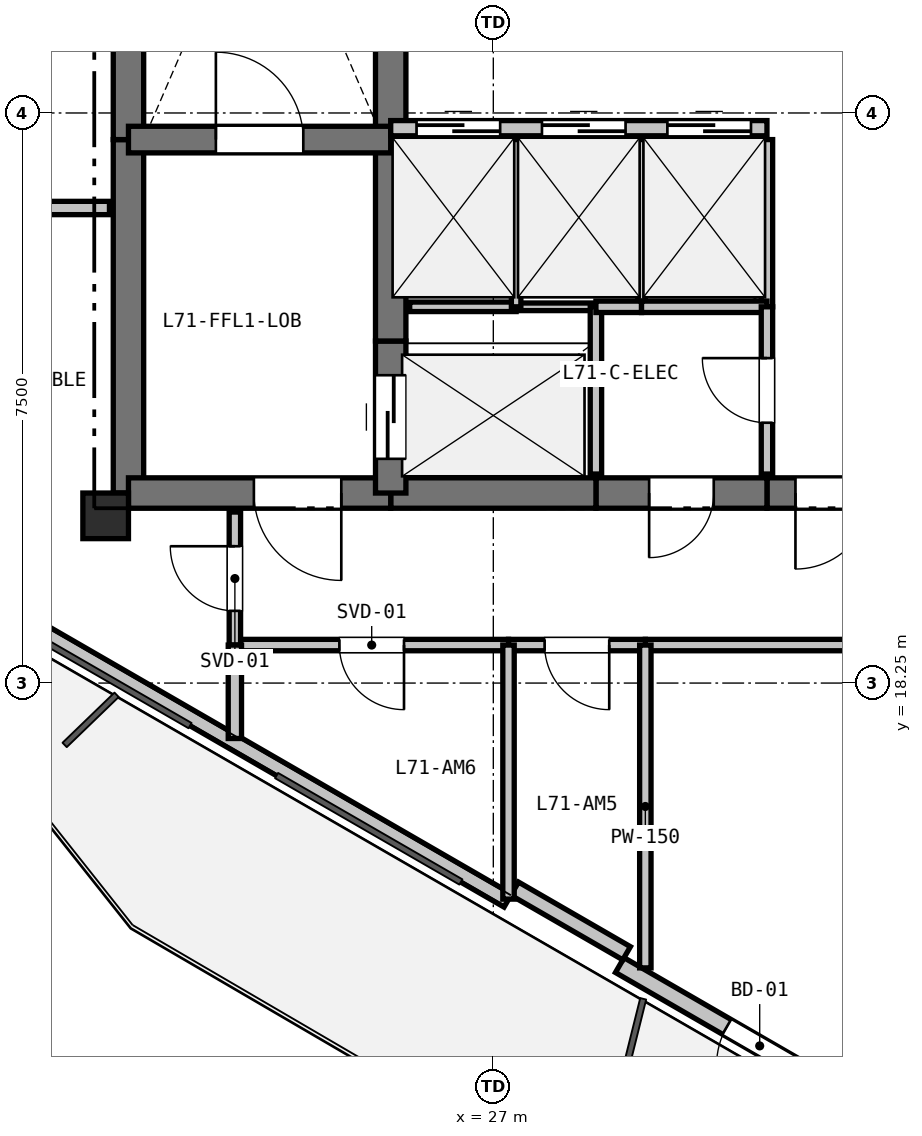
"""IFC4 building model, lengths in metres.
Left out: names, types, materials, properties, quantities, classifications, styles, units other than length and angle.
Written with IfcOpenShell. Run it as: python <this file> out.ifc"""

import sys

from ifc_helpers import new_model, si_unit, direction, frame, frame_2d, origin, origin_2d, place, context, subcontext, project, spatial, rectangle, extrude, element, fill, save


model = new_model("IFC4")
c1 = context("Model", 3, precision=1e-05, world=origin(), true_north=direction((0.0, 1.0)))
c2 = subcontext(c1, "Body", "Model", "MODEL_VIEW")
j1 = project(units=[si_unit("LENGTHUNIT", "METRE"), si_unit("PLANEANGLEUNIT", "RADIAN")], contexts=[c1])
p1 = place(None, origin())
s1 = spatial("IfcSite", under=j1, at=p1, CompositionType="ELEMENT")
p2 = place(p1, origin())
s2 = spatial("IfcBuilding", under=s1, at=p2, CompositionType="ELEMENT")
p3 = place(p2, frame((0.0, 0.0, 254.1)))
s3 = spatial("IfcBuildingStorey", under=s2, at=p3, CompositionType="ELEMENT", Elevation=254.1)
p4 = place(p3, frame((21.9, 20.45, 0.0), z_axis=(0.0, 0.0, 1.0), x_axis=(1.0, 0.0, 0.0)))
e1 = element("IfcColumn", 1, at=p4, inside=s3, PredefinedType="COLUMN", context=c2, shape_type="SweptSolid", body=[
    extrude(rectangle(XDim=0.6, YDim=0.6, at=origin_2d()), origin(), (0.0, 0.0, 1.0), 4.5),
])
p5 = place(p3, frame((36.395, 10.076, 0.0), z_axis=(0.0, 0.0, 1.0), x_axis=(-0.866026655105, 0.499997832642, 0.0)))
e2 = element("IfcWall", 2, at=p5, inside=s3, PredefinedType="SOLIDWALL", context=c2, shape_type="SweptSolid", body=[
    extrude(rectangle(XDim=8.928, YDim=0.225, at=frame_2d((4.464, 0.0))), origin(), (0.0, 0.0, 1.0), 3.8),
])
p6 = place(p5, frame((6.302, 0.0, 0.0)))
e3 = element("IfcOpeningElement", 3, at=p6, cuts=e2, PredefinedType="OPENING", context=c2, shape_type="SweptSolid", body=[
    extrude(rectangle(XDim=1.0, YDim=2.1, at=frame_2d((0.5, 1.05))), frame((0.0, 0.123, 0.0), z_axis=(0.0, -1.0, 0.0), x_axis=(1.0, 0.0, 0.0)), (0.0, 0.0, 1.0), 0.245),
])
p7 = place(p3, frame((27.191, 15.389, 0.0), z_axis=(0.0, 0.0, 1.0), x_axis=(-0.866019557082, 0.500010126649, 0.0)))
e4 = element("IfcWall", 4, at=p7, inside=s3, PredefinedType="PARAPET", context=c2, shape_type="SweptSolid", body=[
    extrude(rectangle(XDim=8.228, YDim=0.2, at=frame_2d((4.114, 0.0))), origin(), (0.0, 0.0, 1.0), 0.2),
])
p8 = place(p3, frame((28.754, 14.695, 0.0), z_axis=(0.0, 0.0, 1.0), x_axis=(-0.866025371046, 0.500000056704, 0.0)))
e5 = element("IfcWall", 5, at=p8, inside=s3, PredefinedType="PARAPET", context=c2, shape_type="SweptSolid", body=[
    extrude(rectangle(XDim=1.7, YDim=0.2, at=frame_2d((0.85, 0.0))), origin(), (0.0, 0.0, 1.0), 3.8),
])
p9 = place(p3, frame((22.2, 20.75, 0.0), z_axis=(0.0, 0.0, 1.0), x_axis=(0.0, 1.0, 0.0)))
e6 = element("IfcWall", 6, at=p9, inside=s3, PredefinedType="SHEAR", context=c2, shape_type="SweptSolid", body=[
    extrude(rectangle(XDim=4.65, YDim=0.4, at=frame_2d((2.325, 0.0))), origin(), (0.0, 0.0, 1.0), 4.18),
])
p10 = place(p3, frame((22.2, 25.4, 0.0), z_axis=(0.0, 0.0, 1.0), x_axis=(0.0, 1.0, 0.0)))
e7 = element("IfcWall", 7, at=p10, inside=s3, PredefinedType="SHEAR", context=c2, shape_type="SweptSolid", body=[
    extrude(rectangle(XDim=7.35, YDim=0.4, at=frame_2d((3.675, 0.0))), origin(), (0.0, 0.0, 1.0), 4.18),
])
p11 = place(p3, frame((32.35, 20.75, 0.0), z_axis=(0.0, 0.0, 1.0), x_axis=(-1.0, 0.0, 0.0)))
e8 = element("IfcWall", 8, at=p11, inside=s3, PredefinedType="SHEAR", context=c2, shape_type="SweptSolid", body=[
    extrude(rectangle(XDim=1.75, YDim=0.4, at=frame_2d((0.875, 0.0))), origin(), (0.0, 0.0, 1.0), 4.18),
])
p12 = place(p11, frame((0.375, 0.0, 0.0)))
e9 = element("IfcOpeningElement", 9, at=p12, cuts=e8, PredefinedType="OPENING", context=c2, shape_type="SweptSolid", body=[
    extrude(rectangle(XDim=1.0, YDim=2.15, at=frame_2d((0.5, 1.075))), frame((0.0, 0.21, 0.0), z_axis=(0.0, -1.0, 0.0), x_axis=(1.0, 0.0, 0.0)), (0.0, 0.0, 1.0), 0.42),
])
p13 = place(p3, frame((30.6, 20.75, 0.0), z_axis=(0.0, 0.0, 1.0), x_axis=(-1.0, 0.0, 0.0)))
e10 = element("IfcWall", 10, at=p13, inside=s3, PredefinedType="SHEAR", context=c2, shape_type="SweptSolid", body=[
    extrude(rectangle(XDim=2.25, YDim=0.4, at=frame_2d((1.125, 0.0))), origin(), (0.0, 0.0, 1.0), 4.18),
])
p14 = place(p13, frame((0.7, 0.0, 0.0)))
e11 = element("IfcOpeningElement", 11, at=p14, cuts=e10, PredefinedType="OPENING", context=c2, shape_type="SweptSolid", body=[
    extrude(rectangle(XDim=0.85, YDim=2.1, at=frame_2d((0.425, 1.05))), frame((0.0, 0.21, 0.0), z_axis=(0.0, -1.0, 0.0), x_axis=(1.0, 0.0, 0.0)), (0.0, 0.0, 1.0), 0.42),
])
p15 = place(p3, frame((28.35, 20.75, 0.0), z_axis=(0.0, 0.0, 1.0), x_axis=(-1.0, 0.0, 0.0)))
e12 = element("IfcWall", 12, at=p15, inside=s3, PredefinedType="SHEAR", context=c2, shape_type="SweptSolid", body=[
    extrude(rectangle(XDim=2.7, YDim=0.4, at=frame_2d((1.35, 0.0))), origin(), (0.0, 0.0, 1.0), 4.18),
])
p16 = place(p3, frame((25.65, 20.75, 0.0), z_axis=(0.0, 0.0, 1.0), x_axis=(-1.0, 0.0, 0.0)))
e13 = element("IfcWall", 13, at=p16, inside=s3, PredefinedType="SHEAR", context=c2, shape_type="SweptSolid", body=[
    extrude(rectangle(XDim=3.45, YDim=0.4, at=frame_2d((1.725, 0.0))), origin(), (0.0, 0.0, 1.0), 4.18),
])
p17 = place(p16, frame((0.65, 0.0, 0.0)))
e14 = element("IfcOpeningElement", 14, at=p17, cuts=e13, PredefinedType="OPENING", context=c2, shape_type="SweptSolid", body=[
    extrude(rectangle(XDim=1.15, YDim=2.15, at=frame_2d((0.575, 1.075))), frame((0.0, 0.21, 0.0), z_axis=(0.0, -1.0, 0.0), x_axis=(1.0, 0.0, 0.0)), (0.0, 0.0, 1.0), 0.42),
])
p18 = place(p3, frame((25.65, 20.75, 0.0), z_axis=(0.0, 0.0, 1.0), x_axis=(0.0, 1.0, 0.0)))
e15 = element("IfcWall", 15, at=p18, inside=s3, PredefinedType="SHEAR", context=c2, shape_type="SweptSolid", body=[
    extrude(rectangle(XDim=2.0, YDim=0.4, at=frame_2d((1.0, 0.0))), origin(), (0.0, 0.0, 1.0), 4.18),
])
p19 = place(p18, frame((0.45, 0.0, 0.0)))
e16 = element("IfcOpeningElement", 16, at=p19, cuts=e15, PredefinedType="OPENING", context=c2, shape_type="SweptSolid", body=[
    extrude(rectangle(XDim=1.1, YDim=2.15, at=frame_2d((0.55, 1.075))), frame((0.0, 0.21, 0.0), z_axis=(0.0, -1.0, 0.0), x_axis=(1.0, 0.0, 0.0)), (0.0, 0.0, 1.0), 0.42),
])
p20 = place(p3, frame((25.65, 22.75, 0.0), z_axis=(0.0, 0.0, 1.0), x_axis=(0.0, 1.0, 0.0)))
e17 = element("IfcWall", 17, at=p20, inside=s3, PredefinedType="SHEAR", context=c2, shape_type="SweptSolid", body=[
    extrude(rectangle(XDim=2.8, YDim=0.4, at=frame_2d((1.4, 0.0))), origin(), (0.0, 0.0, 1.0), 4.18),
])
p21 = place(p3, frame((25.65, 25.55, 0.0), z_axis=(0.0, 0.0, 1.0), x_axis=(0.0, 1.0, 0.0)))
e18 = element("IfcWall", 18, at=p21, inside=s3, PredefinedType="SHEAR", context=c2, shape_type="SweptSolid", body=[
    extrude(rectangle(XDim=2.4, YDim=0.4, at=frame_2d((1.2, 0.0))), origin(), (0.0, 0.0, 1.0), 4.18),
])
p22 = place(p3, frame((22.2, 25.4, 0.0), z_axis=(0.0, 0.0, 1.0), x_axis=(1.0, 0.0, 0.0)))
e19 = element("IfcWall", 19, at=p22, inside=s3, PredefinedType="SHEAR", context=c2, shape_type="SweptSolid", body=[
    extrude(rectangle(XDim=3.45, YDim=0.35, at=frame_2d((1.725, 0.0))), origin(), (0.0, 0.0, 1.0), 4.18),
])
p23 = place(p22, frame((1.15, 0.0, 0.0)))
e20 = element("IfcOpeningElement", 20, at=p23, cuts=e19, PredefinedType="OPENING", context=c2, shape_type="SweptSolid", body=[
    extrude(rectangle(XDim=1.15, YDim=2.15, at=frame_2d((0.575, 1.075))), frame((0.0, 0.185, 0.0), z_axis=(0.0, -1.0, 0.0), x_axis=(1.0, 0.0, 0.0)), (0.0, 0.0, 1.0), 0.37),
])
p24 = place(p3, frame((25.65, 25.55, 0.0), z_axis=(0.0, 0.0, 1.0), x_axis=(1.0, 0.0, 0.0)))
e21 = element("IfcWall", 21, at=p24, inside=s3, PredefinedType="PARTITIONING", context=c2, shape_type="SweptSolid", body=[
    extrude(rectangle(XDim=4.95, YDim=0.2, at=frame_2d((2.475, 0.0))), origin(), (0.0, 0.0, 1.0), 4.18),
])
p25 = place(p24, frame((0.34, 0.0, 0.0)))
e22 = element("IfcOpeningElement", 22, at=p25, cuts=e21, PredefinedType="OPENING", context=c2, shape_type="SweptSolid", body=[
    extrude(rectangle(XDim=1.1, YDim=2.15, at=frame_2d((0.55, 1.075))), frame((0.0, 0.11, 0.0), z_axis=(0.0, -1.0, 0.0), x_axis=(1.0, 0.0, 0.0)), (0.0, 0.0, 1.0), 0.22),
])
p26 = place(p24, frame((1.99, 0.0, 0.0)))
e23 = element("IfcOpeningElement", 23, at=p26, cuts=e21, PredefinedType="OPENING", context=c2, shape_type="SweptSolid", body=[
    extrude(rectangle(XDim=1.1, YDim=2.15, at=frame_2d((0.55, 1.075))), frame((0.0, 0.11, 0.0), z_axis=(0.0, -1.0, 0.0), x_axis=(1.0, 0.0, 0.0)), (0.0, 0.0, 1.0), 0.22),
])
p27 = place(p24, frame((3.64, 0.0, 0.0)))
e24 = element("IfcOpeningElement", 24, at=p27, cuts=e21, PredefinedType="OPENING", context=c2, shape_type="SweptSolid", body=[
    extrude(rectangle(XDim=1.1, YDim=2.15, at=frame_2d((0.55, 1.075))), frame((0.0, 0.11, 0.0), z_axis=(0.0, -1.0, 0.0), x_axis=(1.0, 0.0, 0.0)), (0.0, 0.0, 1.0), 0.22),
])
p28 = place(p3, frame((25.9, 23.2, 0.0), z_axis=(0.0, 0.0, 1.0), x_axis=(1.0, 0.0, 0.0)))
e25 = element("IfcWall", 25, at=p28, inside=s3, PredefinedType="PARTITIONING", context=c2, shape_type="SweptSolid", body=[
    extrude(rectangle(XDim=1.4, YDim=0.125, at=frame_2d((0.7, 0.0))), origin(), (0.0, 0.0, 1.0), 4.18),
])
p29 = place(p3, frame((27.3, 23.2, 0.0), z_axis=(0.0, 0.0, 1.0), x_axis=(1.0, 0.0, 0.0)))
e26 = element("IfcWall", 26, at=p29, inside=s3, PredefinedType="PARTITIONING", context=c2, shape_type="SweptSolid", body=[
    extrude(rectangle(XDim=1.05, YDim=0.1, at=frame_2d((0.525, 0.0))), origin(), (0.0, 0.0, 1.0), 4.18),
])
p30 = place(p3, frame((28.35, 23.2, 0.0), z_axis=(0.0, 0.0, 1.0), x_axis=(0.0, -1.0, 0.0)))
e27 = element("IfcWall", 27, at=p30, inside=s3, PredefinedType="PARTITIONING", context=c2, shape_type="SweptSolid", body=[
    extrude(rectangle(XDim=2.2, YDim=0.15, at=frame_2d((1.1, 0.0))), origin(), (0.0, 0.0, 1.0), 4.18),
])
p31 = place(p3, frame((27.3, 25.4, 0.0), z_axis=(0.0, 0.0, 1.0), x_axis=(0.0, -1.0, 0.0)))
e28 = element("IfcWall", 28, at=p31, inside=s3, PredefinedType="PARTITIONING", context=c2, shape_type="SweptSolid", body=[
    extrude(rectangle(XDim=2.2, YDim=0.125, at=frame_2d((1.1, 0.0))), origin(), (0.0, 0.0, 1.0), 4.18),
])
p32 = place(p3, frame((28.95, 25.4, 0.0), z_axis=(0.0, 0.0, 1.0), x_axis=(0.0, -1.0, 0.0)))
e29 = element("IfcWall", 29, at=p32, inside=s3, PredefinedType="PARTITIONING", context=c2, shape_type="SweptSolid", body=[
    extrude(rectangle(XDim=2.2, YDim=0.1, at=frame_2d((1.1, 0.0))), origin(), (0.0, 0.0, 1.0), 4.18),
])
p33 = place(p3, frame((28.95, 23.2, 0.0), z_axis=(0.0, 0.0, 1.0), x_axis=(-1.0, 0.0, 0.0)))
e30 = element("IfcWall", 30, at=p33, inside=s3, PredefinedType="PARTITIONING", context=c2, shape_type="SweptSolid", body=[
    extrude(rectangle(XDim=0.6, YDim=0.15, at=frame_2d((0.3, 0.0))), origin(), (0.0, 0.0, 1.0), 4.18),
])
p34 = place(p3, frame((30.6, 25.4, 0.0), z_axis=(0.0, 0.0, 1.0), x_axis=(0.0, -1.0, 0.0)))
e31 = element("IfcWall", 31, at=p34, inside=s3, PredefinedType="PARTITIONING", context=c2, shape_type="SweptSolid", body=[
    extrude(rectangle(XDim=2.2, YDim=0.15, at=frame_2d((1.1, 0.0))), origin(), (0.0, 0.0, 1.0), 4.18),
])
p35 = place(p3, frame((30.6, 23.2, 0.0), z_axis=(0.0, 0.0, 1.0), x_axis=(-1.0, 0.0, 0.0)))
e32 = element("IfcWall", 32, at=p35, inside=s3, PredefinedType="PARTITIONING", context=c2, shape_type="SweptSolid", body=[
    extrude(rectangle(XDim=1.65, YDim=0.15, at=frame_2d((0.825, 0.0))), origin(), (0.0, 0.0, 1.0), 4.18),
])
p36 = place(p3, frame((30.6, 21.0, 0.0), z_axis=(0.0, 0.0, 1.0), x_axis=(0.0, 1.0, 0.0)))
e33 = element("IfcWall", 33, at=p36, inside=s3, PredefinedType="PARTITIONING", context=c2, shape_type="SweptSolid", body=[
    extrude(rectangle(XDim=2.2, YDim=0.15, at=frame_2d((1.1, 0.0))), origin(), (0.0, 0.0, 1.0), 4.18),
])
p37 = place(p36, frame((0.675, 0.0, 0.0)))
e34 = element("IfcOpeningElement", 34, at=p37, cuts=e33, PredefinedType="OPENING", context=c2, shape_type="SweptSolid", body=[
    extrude(rectangle(XDim=0.85, YDim=2.1, at=frame_2d((0.425, 1.05))), frame((0.0, 0.085, 0.0), z_axis=(0.0, -1.0, 0.0), x_axis=(1.0, 0.0, 0.0)), (0.0, 0.0, 1.0), 0.17),
])
p38 = place(p3, frame((38.45, 18.75, 0.0), z_axis=(0.0, 0.0, 1.0), x_axis=(-1.0, 0.0, 0.0)))
e35 = element("IfcWall", 35, at=p38, inside=s3, PredefinedType="PARTITIONING", context=c2, shape_type="SweptSolid", body=[
    extrude(rectangle(XDim=9.45, YDim=0.15, at=frame_2d((4.725, 0.0))), origin(), (0.0, 0.0, 1.0), 3.628),
])
p39 = place(p38, frame((4.225, 0.0, 0.0)))
e36 = element("IfcOpeningElement", 36, at=p39, cuts=e35, PredefinedType="OPENING", context=c2, shape_type="SweptSolid", body=[
    extrude(rectangle(XDim=1.0, YDim=2.15, at=frame_2d((0.5, 1.075))), frame((0.0, 0.085, 0.0), z_axis=(0.0, -1.0, 0.0), x_axis=(1.0, 0.0, 0.0)), (0.0, 0.0, 1.0), 0.17),
])
p40 = place(p3, frame((29.0, 18.75, 0.0), z_axis=(0.0, 0.0, 1.0), x_axis=(-1.0, 0.0, 0.0)))
e37 = element("IfcWall", 37, at=p40, inside=s3, PredefinedType="PARTITIONING", context=c2, shape_type="SweptSolid", body=[
    extrude(rectangle(XDim=1.8, YDim=0.15, at=frame_2d((0.9, 0.0))), origin(), (0.0, 0.0, 1.0), 4.18),
])
p41 = place(p40, frame((0.475, 0.0, 0.0)))
e38 = element("IfcOpeningElement", 38, at=p41, cuts=e37, PredefinedType="OPENING", context=c2, shape_type="SweptSolid", body=[
    extrude(rectangle(XDim=0.85, YDim=2.1, at=frame_2d((0.425, 1.05))), frame((0.0, 0.085, 0.0), z_axis=(0.0, -1.0, 0.0), x_axis=(1.0, 0.0, 0.0)), (0.0, 0.0, 1.0), 0.17),
])
p42 = place(p3, frame((27.2, 18.75, 0.0), z_axis=(0.0, 0.0, 1.0), x_axis=(-1.0, 0.0, 0.0)))
e39 = element("IfcWall", 39, at=p42, inside=s3, PredefinedType="PARTITIONING", context=c2, shape_type="SweptSolid", body=[
    extrude(rectangle(XDim=3.6, YDim=0.15, at=frame_2d((1.8, 0.0))), origin(), (0.0, 0.0, 1.0), 3.628),
])
p43 = place(p42, frame((1.375, 0.0, 0.0)))
e40 = element("IfcOpeningElement", 40, at=p43, cuts=e39, PredefinedType="OPENING", context=c2, shape_type="SweptSolid", body=[
    extrude(rectangle(XDim=0.85, YDim=2.1, at=frame_2d((0.425, 1.05))), frame((0.0, 0.085, 0.0), z_axis=(0.0, -1.0, 0.0), x_axis=(1.0, 0.0, 0.0)), (0.0, 0.0, 1.0), 0.17),
])
p44 = place(p3, frame((23.6, 18.75, 0.0), z_axis=(0.0, 0.0, 1.0), x_axis=(0.0, 1.0, 0.0)))
e41 = element("IfcWall", 41, at=p44, inside=s3, PredefinedType="PARTITIONING", context=c2, shape_type="SweptSolid", body=[
    extrude(rectangle(XDim=1.75, YDim=0.15, at=frame_2d((0.875, 0.0))), origin(), (0.0, 0.0, 1.0), 3.628),
])
p45 = place(p44, frame((0.45, 0.0, 0.0)))
e42 = element("IfcOpeningElement", 42, at=p45, cuts=e41, PredefinedType="OPENING", context=c2, shape_type="SweptSolid", body=[
    extrude(rectangle(XDim=0.85, YDim=2.1, at=frame_2d((0.425, 1.05))), frame((0.0, 0.085, 0.0), z_axis=(0.0, -1.0, 0.0), x_axis=(1.0, 0.0, 0.0)), (0.0, 0.0, 1.0), 0.17),
])
p46 = place(p3, frame((27.2, 18.75, 0.0), z_axis=(0.0, 0.0, 1.0), x_axis=(0.0, -1.0, 0.0)))
e43 = element("IfcWall", 43, at=p46, inside=s3, PredefinedType="PARTITIONING", context=c2, shape_type="SweptSolid", body=[
    extrude(rectangle(XDim=3.342, YDim=0.15, at=frame_2d((1.671, 0.0))), origin(), (0.0, 0.0, 1.0), 2.365),
])
p47 = place(p3, frame((23.6, 17.521, 0.0), z_axis=(0.0, 0.0, 1.0), x_axis=(0.0, 1.0, 0.0)))
e44 = element("IfcWall", 44, at=p47, inside=s3, PredefinedType="PLUMBINGWALL", context=c2, shape_type="SweptSolid", body=[
    extrude(rectangle(XDim=1.229, YDim=0.175, at=frame_2d((0.615, 0.0))), origin(), (0.0, 0.0, 1.0), 2.365),
])
p48 = place(p3, frame((17.17, 24.5, 0.0), z_axis=(0.0, 0.0, 1.0), x_axis=(1.0, 0.0, 0.0)))
e45 = element("IfcWall", 45, at=p48, inside=s3, PredefinedType="PLUMBINGWALL", context=c2, shape_type="SweptSolid", body=[
    extrude(rectangle(XDim=4.78, YDim=0.175, at=frame_2d((2.39, 0.0))), origin(), (0.0, 0.0, 1.0), 3.705),
])
p49 = place(p3, frame((29.0, 14.503, 0.0), z_axis=(0.0, 0.0, 1.0), x_axis=(0.0, 1.0, 0.0)))
e46 = element("IfcWall", 46, at=p49, inside=s3, PredefinedType="PARTITIONING", context=c2, shape_type="SweptSolid", body=[
    extrude(rectangle(XDim=4.247, YDim=0.15, at=frame_2d((2.124, 0.0))), origin(), (0.0, 0.0, 1.0), 2.365),
])
p50 = place(p6, origin())
e47 = element("IfcDoor", 47, at=p50, inside=s3, OperationType="SINGLE_SWING_LEFT", PredefinedType="DOOR", context=c2, shape_type="SweptSolid", body=[
    extrude(rectangle(XDim=1.0, YDim=2.1, at=frame_2d((0.5, 1.05))), frame((0.0, 0.025, 0.0), z_axis=(0.0, -1.0, 0.0), x_axis=(1.0, 0.0, 0.0)), (0.0, 0.0, 1.0), 0.05),
])
fill(e3, e47)
p51 = place(p25, origin())
e48 = element("IfcDoor", 48, at=p51, inside=s3, OperationType="SLIDING_TO_LEFT", PredefinedType="DOOR", context=c2, shape_type="SweptSolid", body=[
    extrude(rectangle(XDim=1.1, YDim=2.15, at=frame_2d((0.55, 1.075))), frame((0.0, 0.025, 0.0), z_axis=(0.0, -1.0, 0.0), x_axis=(1.0, 0.0, 0.0)), (0.0, 0.0, 1.0), 0.05),
])
fill(e22, e48)
p52 = place(p26, origin())
e49 = element("IfcDoor", 49, at=p52, inside=s3, OperationType="SLIDING_TO_LEFT", PredefinedType="DOOR", context=c2, shape_type="SweptSolid", body=[
    extrude(rectangle(XDim=1.1, YDim=2.15, at=frame_2d((0.55, 1.075))), frame((0.0, 0.025, 0.0), z_axis=(0.0, -1.0, 0.0), x_axis=(1.0, 0.0, 0.0)), (0.0, 0.0, 1.0), 0.05),
])
fill(e23, e49)
p53 = place(p27, origin())
e50 = element("IfcDoor", 50, at=p53, inside=s3, OperationType="SLIDING_TO_LEFT", PredefinedType="DOOR", context=c2, shape_type="SweptSolid", body=[
    extrude(rectangle(XDim=1.1, YDim=2.15, at=frame_2d((0.55, 1.075))), frame((0.0, 0.025, 0.0), z_axis=(0.0, -1.0, 0.0), x_axis=(1.0, 0.0, 0.0)), (0.0, 0.0, 1.0), 0.05),
])
fill(e24, e50)
p54 = place(p12, origin())
e51 = element("IfcDoor", 51, at=p54, inside=s3, OperationType="SINGLE_SWING_RIGHT", PredefinedType="DOOR", context=c2, shape_type="SweptSolid", body=[
    extrude(rectangle(XDim=1.0, YDim=2.15, at=frame_2d((0.5, 1.075))), frame((0.0, 0.025, 0.0), z_axis=(0.0, -1.0, 0.0), x_axis=(1.0, 0.0, 0.0)), (0.0, 0.0, 1.0), 0.05),
])
fill(e9, e51)
p55 = place(p19, origin())
e52 = element("IfcDoor", 52, at=p55, inside=s3, OperationType="SLIDING_TO_LEFT", PredefinedType="DOOR", context=c2, shape_type="SweptSolid", body=[
    extrude(rectangle(XDim=1.1, YDim=2.15, at=frame_2d((0.55, 1.075))), frame((0.0, 0.025, 0.0), z_axis=(0.0, -1.0, 0.0), x_axis=(1.0, 0.0, 0.0)), (0.0, 0.0, 1.0), 0.05),
])
fill(e16, e52)
p56 = place(p23, origin())
e53 = element("IfcDoor", 53, at=p56, inside=s3, OperationType="SINGLE_SWING_LEFT", PredefinedType="DOOR", context=c2, shape_type="SweptSolid", body=[
    extrude(rectangle(XDim=1.15, YDim=2.15, at=frame_2d((0.575, 1.075))), frame((0.0, 0.025, 0.0), z_axis=(0.0, -1.0, 0.0), x_axis=(1.0, 0.0, 0.0)), (0.0, 0.0, 1.0), 0.05),
])
fill(e20, e53)
p57 = place(p17, origin())
e54 = element("IfcDoor", 54, at=p57, inside=s3, OperationType="SINGLE_SWING_LEFT", PredefinedType="DOOR", context=c2, shape_type="SweptSolid", body=[
    extrude(rectangle(XDim=1.15, YDim=2.15, at=frame_2d((0.575, 1.075))), frame((0.0, 0.025, 0.0), z_axis=(0.0, -1.0, 0.0), x_axis=(1.0, 0.0, 0.0)), (0.0, 0.0, 1.0), 0.05),
])
fill(e14, e54)
p58 = place(p37, origin())
e55 = element("IfcDoor", 55, at=p58, inside=s3, OperationType="SINGLE_SWING_RIGHT", PredefinedType="DOOR", context=c2, shape_type="SweptSolid", body=[
    extrude(rectangle(XDim=0.85, YDim=2.1, at=frame_2d((0.425, 1.05))), frame((0.0, 0.025, 0.0), z_axis=(0.0, -1.0, 0.0), x_axis=(1.0, 0.0, 0.0)), (0.0, 0.0, 1.0), 0.05),
])
fill(e34, e55)
p59 = place(p43, origin())
e56 = element("IfcDoor", 56, at=p59, inside=s3, OperationType="SINGLE_SWING_LEFT", PredefinedType="DOOR", context=c2, shape_type="SweptSolid", body=[
    extrude(rectangle(XDim=0.85, YDim=2.1, at=frame_2d((0.425, 1.05))), frame((0.0, 0.025, 0.0), z_axis=(0.0, -1.0, 0.0), x_axis=(1.0, 0.0, 0.0)), (0.0, 0.0, 1.0), 0.05),
])
fill(e40, e56)
p60 = place(p45, origin())
e57 = element("IfcDoor", 57, at=p60, inside=s3, OperationType="SINGLE_SWING_RIGHT", PredefinedType="DOOR", context=c2, shape_type="SweptSolid", body=[
    extrude(rectangle(XDim=0.85, YDim=2.1, at=frame_2d((0.425, 1.05))), frame((0.0, 0.025, 0.0), z_axis=(0.0, -1.0, 0.0), x_axis=(1.0, 0.0, 0.0)), (0.0, 0.0, 1.0), 0.05),
])
fill(e42, e57)
p61 = place(p14, origin())
e58 = element("IfcDoor", 58, at=p61, inside=s3, OperationType="SINGLE_SWING_RIGHT", PredefinedType="DOOR", context=c2, shape_type="SweptSolid", body=[
    extrude(rectangle(XDim=0.85, YDim=2.1, at=frame_2d((0.425, 1.05))), frame((0.0, 0.025, 0.0), z_axis=(0.0, -1.0, 0.0), x_axis=(1.0, 0.0, 0.0)), (0.0, 0.0, 1.0), 0.05),
])
fill(e11, e58)
p62 = place(p41, origin())
e59 = element("IfcDoor", 59, at=p62, inside=s3, OperationType="SINGLE_SWING_LEFT", PredefinedType="DOOR", context=c2, shape_type="SweptSolid", body=[
    extrude(rectangle(XDim=0.85, YDim=2.1, at=frame_2d((0.425, 1.05))), frame((0.0, 0.025, 0.0), z_axis=(0.0, -1.0, 0.0), x_axis=(1.0, 0.0, 0.0)), (0.0, 0.0, 1.0), 0.05),
])
fill(e38, e59)
save(model, sys.argv[1])
